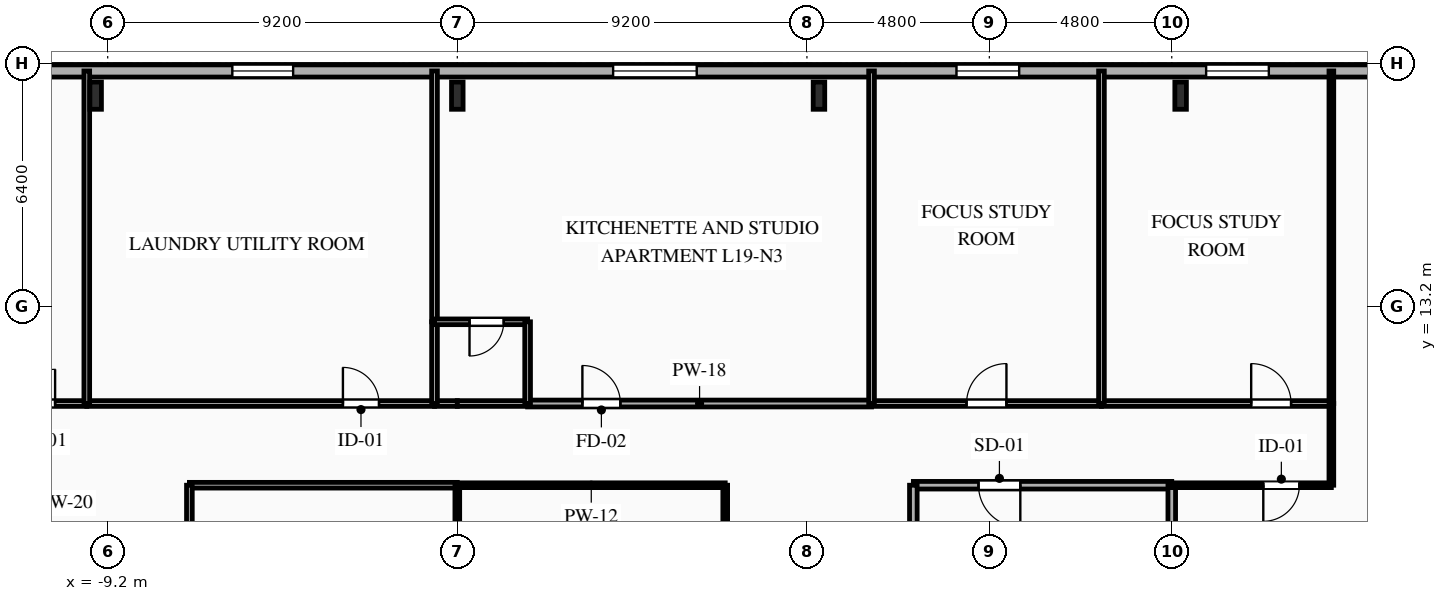
"""IFC4 building model, lengths in metres.
Left out: names, types, materials, properties, quantities, classifications, styles, units other than length and angle.
Written with IfcOpenShell. Run it as: python <this file> out.ifc"""

import sys

from ifc_helpers import new_model, si_unit, direction, frame, frame_2d, origin, origin_2d, place, context, subcontext, project, spatial, rectangle, i_section, extrude, element, fill, save


model = new_model("IFC4")
c1 = context("Model", 3, precision=1e-05, world=origin(), true_north=direction((0.0, 1.0)))
c2 = subcontext(c1, "Body", "Model", "MODEL_VIEW")
j1 = project(units=[si_unit("LENGTHUNIT", "METRE"), si_unit("PLANEANGLEUNIT", "RADIAN")], contexts=[c1])
p1 = place(None, origin())
s1 = spatial("IfcSite", under=j1, at=p1, CompositionType="ELEMENT")
p2 = place(p1, origin())
s2 = spatial("IfcBuilding", under=s1, at=p2, CompositionType="ELEMENT")
p3 = place(p2, frame((0.0, 0.0, 70.55)))
s3 = spatial("IfcBuildingStorey", under=s2, at=p3, CompositionType="ELEMENT", Elevation=70.55)
for number, where, z_axis, x_axis in (
    (1, (19.033, 18.75, 0.0), (0.0, 0.0, 1.0), (1.0, 0.0, 0.0)),
    (2, (9.517, 18.75, 0.0), (0.0, 0.0, 1.0), (1.0, 0.0, 0.0)),
    (3, (0.0, 18.75, 0.0), (0.0, 0.0, 1.0), (1.0, 0.0, 0.0)),
    (4, (-9.517, 18.75, 0.0), (0.0, 0.0, 1.0), (1.0, 0.0, 0.0)),
):
    element("IfcColumn", number, at=place(p3, frame(where, z_axis=z_axis, x_axis=x_axis)), inside=s3, PredefinedType="COLUMN", context=c2, shape_type="SweptSolid", body=[
        extrude(i_section(OverallWidth=0.304, OverallDepth=0.716, WebThickness=0.021, FlangeThickness=0.04, FilletRadius=0.027, at=origin_2d()), origin(), (0.0, 0.0, 1.0), 3.35),
    ])
p4 = place(p3, frame((-29.2, 19.4, 0.0), z_axis=(0.0, 0.0, 1.0), x_axis=(1.0, 0.0, 0.0)))
e5 = element("IfcWall", 5, at=p4, inside=s3, PredefinedType="SOLIDWALL", context=c2, shape_type="SweptSolid", body=[
    extrude(rectangle(XDim=58.4, YDim=0.32, at=frame_2d((29.2, 0.0))), origin(), (0.0, 0.0, 1.0), 3.0),
])
p5 = place(p4, frame((1.255, 0.0, 0.85)))
e6 = element("IfcOpeningElement", 6, at=p5, cuts=e5, PredefinedType="OPENING", context=c2, shape_type="SweptSolid", body=[
    extrude(rectangle(XDim=1.65, YDim=1.85, at=frame_2d((0.825, 0.925))), frame((0.0, 0.17, 0.0), z_axis=(0.0, -1.0, 0.0), x_axis=(1.0, 0.0, 0.0)), (0.0, 0.0, 1.0), 0.34),
])
p6 = place(p4, frame((4.26, 0.0, 0.85)))
e7 = element("IfcOpeningElement", 7, at=p6, cuts=e5, PredefinedType="OPENING", context=c2, shape_type="SweptSolid", body=[
    extrude(rectangle(XDim=1.4, YDim=1.85, at=frame_2d((0.7, 0.925))), frame((0.0, 0.17, 0.0), z_axis=(0.0, -1.0, 0.0), x_axis=(1.0, 0.0, 0.0)), (0.0, 0.0, 1.0), 0.34),
])
p7 = place(p4, frame((8.135, 0.0, 0.85)))
e8 = element("IfcOpeningElement", 8, at=p7, cuts=e5, PredefinedType="OPENING", context=c2, shape_type="SweptSolid", body=[
    extrude(rectangle(XDim=1.65, YDim=1.85, at=frame_2d((0.825, 0.925))), frame((0.0, 0.17, 0.0), z_axis=(0.0, -1.0, 0.0), x_axis=(1.0, 0.0, 0.0)), (0.0, 0.0, 1.0), 0.34),
])
p8 = place(p4, frame((13.575, 0.0, 0.85)))
e9 = element("IfcOpeningElement", 9, at=p8, cuts=e5, PredefinedType="OPENING", context=c2, shape_type="SweptSolid", body=[
    extrude(rectangle(XDim=1.65, YDim=1.85, at=frame_2d((0.825, 0.925))), frame((0.0, 0.17, 0.0), z_axis=(0.0, -1.0, 0.0), x_axis=(1.0, 0.0, 0.0)), (0.0, 0.0, 1.0), 0.34),
])
p9 = place(p4, frame((23.28, 0.0, 0.85)))
e10 = element("IfcOpeningElement", 10, at=p9, cuts=e5, PredefinedType="OPENING", context=c2, shape_type="SweptSolid", body=[
    extrude(rectangle(XDim=1.6, YDim=1.85, at=frame_2d((0.8, 0.925))), frame((0.0, 0.17, 0.0), z_axis=(0.0, -1.0, 0.0), x_axis=(1.0, 0.0, 0.0)), (0.0, 0.0, 1.0), 0.34),
])
p10 = place(p4, frame((33.3, 0.0, 0.85)))
e11 = element("IfcOpeningElement", 11, at=p10, cuts=e5, PredefinedType="OPENING", context=c2, shape_type="SweptSolid", body=[
    extrude(rectangle(XDim=2.2, YDim=1.85, at=frame_2d((1.1, 0.925))), frame((0.0, 0.17, 0.0), z_axis=(0.0, -1.0, 0.0), x_axis=(1.0, 0.0, 0.0)), (0.0, 0.0, 1.0), 0.34),
])
p11 = place(p4, frame((42.335, 0.0, 0.85)))
e12 = element("IfcOpeningElement", 12, at=p11, cuts=e5, PredefinedType="OPENING", context=c2, shape_type="SweptSolid", body=[
    extrude(rectangle(XDim=1.65, YDim=1.85, at=frame_2d((0.825, 0.925))), frame((0.0, 0.17, 0.0), z_axis=(0.0, -1.0, 0.0), x_axis=(1.0, 0.0, 0.0)), (0.0, 0.0, 1.0), 0.34),
])
p12 = place(p4, frame((48.905, 0.0, 0.85)))
e13 = element("IfcOpeningElement", 13, at=p12, cuts=e5, PredefinedType="OPENING", context=c2, shape_type="SweptSolid", body=[
    extrude(rectangle(XDim=1.65, YDim=1.85, at=frame_2d((0.825, 0.925))), frame((0.0, 0.17, 0.0), z_axis=(0.0, -1.0, 0.0), x_axis=(1.0, 0.0, 0.0)), (0.0, 0.0, 1.0), 0.34),
])
p13 = place(p4, frame((54.32, 0.0, 0.85)))
e14 = element("IfcOpeningElement", 14, at=p13, cuts=e5, PredefinedType="OPENING", context=c2, shape_type="SweptSolid", body=[
    extrude(rectangle(XDim=1.6, YDim=1.85, at=frame_2d((0.8, 0.925))), frame((0.0, 0.17, 0.0), z_axis=(0.0, -1.0, 0.0), x_axis=(1.0, 0.0, 0.0)), (0.0, 0.0, 1.0), 0.34),
])
p14 = place(p3, frame((18.8, 8.5, 0.0), z_axis=(0.0, 0.0, 1.0), x_axis=(-1.0, 0.0, 0.0)))
e15 = element("IfcWall", 15, at=p14, inside=s3, PredefinedType="PARTITIONING", context=c2, shape_type="SweptSolid", body=[
    extrude(rectangle(XDim=6.8, YDim=0.2, at=frame_2d((3.4, 0.0))), origin(), (0.0, 0.0, 1.0), 3.0),
])
p15 = place(p14, frame((3.985, 0.0, 0.0)))
e16 = element("IfcOpeningElement", 16, at=p15, cuts=e15, PredefinedType="OPENING", context=c2, shape_type="SweptSolid", body=[
    extrude(rectangle(XDim=1.1, YDim=2.15, at=frame_2d((0.55, 1.075))), frame((0.0, 0.11, 0.0), z_axis=(0.0, -1.0, 0.0), x_axis=(1.0, 0.0, 0.0)), (0.0, 0.0, 1.0), 0.22),
])
p16 = place(p3, frame((12.0, 8.5, 0.0), z_axis=(0.0, 0.0, 1.0), x_axis=(0.0, -1.0, 0.0)))
e17 = element("IfcWall", 17, at=p16, inside=s3, PredefinedType="PARTITIONING", context=c2, shape_type="SweptSolid", body=[
    extrude(rectangle(XDim=2.9, YDim=0.2, at=frame_2d((1.45, 0.0))), origin(), (0.0, 0.0, 1.0), 3.0),
])
p17 = place(p3, frame((18.8, 5.6, 0.0), z_axis=(0.0, 0.0, 1.0), x_axis=(0.0, 1.0, 0.0)))
e18 = element("IfcWall", 18, at=p17, inside=s3, PredefinedType="PARTITIONING", context=c2, shape_type="SweptSolid", body=[
    extrude(rectangle(XDim=2.9, YDim=0.2, at=frame_2d((1.45, 0.0))), origin(), (0.0, 0.0, 1.0), 2.485),
])
p18 = place(p3, frame((-12.1, 10.65, 0.0), z_axis=(0.0, 0.0, 1.0), x_axis=(1.0, 0.0, 0.0)))
e19 = element("IfcWall", 19, at=p18, inside=s3, PredefinedType="PLUMBINGWALL", context=c2, shape_type="SweptSolid", body=[
    extrude(rectangle(XDim=2.35, YDim=0.15, at=frame_2d((1.175, 0.0))), origin(), (0.0, 0.0, 1.0), 3.0),
])
p19 = place(p18, frame((0.616, 0.0, 0.0)))
e20 = element("IfcOpeningElement", 20, at=p19, cuts=e19, PredefinedType="OPENING", context=c2, shape_type="SweptSolid", body=[
    extrude(rectangle(XDim=0.9, YDim=2.1, at=frame_2d((0.45, 1.05))), frame((0.0, 0.085, 0.0), z_axis=(0.0, -1.0, 0.0), x_axis=(1.0, 0.0, 0.0)), (0.0, 0.0, 1.0), 0.17),
])
p20 = place(p3, frame((-9.75, 10.65, 0.0), z_axis=(0.0, 0.0, 1.0), x_axis=(1.0, 0.0, 0.0)))
e21 = element("IfcWall", 21, at=p20, inside=s3, PredefinedType="PARTITIONING", context=c2, shape_type="SweptSolid", body=[
    extrude(rectangle(XDim=9.15, YDim=0.15, at=frame_2d((4.575, 0.0))), origin(), (0.0, 0.0, 1.0), 3.0),
])
p21 = place(p20, frame((6.74, 0.0, 0.0)))
e22 = element("IfcOpeningElement", 22, at=p21, cuts=e21, PredefinedType="OPENING", context=c2, shape_type="SweptSolid", body=[
    extrude(rectangle(XDim=0.95, YDim=2.1, at=frame_2d((0.475, 1.05))), frame((0.0, 0.085, 0.0), z_axis=(0.0, -1.0, 0.0), x_axis=(1.0, 0.0, 0.0)), (0.0, 0.0, 1.0), 0.17),
])
p22 = place(p3, frame((-0.6, 10.65, 0.0), z_axis=(0.0, 0.0, 1.0), x_axis=(1.0, 0.0, 0.0)))
e23 = element("IfcWall", 23, at=p22, inside=s3, PredefinedType="PLUMBINGWALL", context=c2, shape_type="SweptSolid", body=[
    extrude(rectangle(XDim=0.6, YDim=0.15, at=frame_2d((0.3, 0.0))), origin(), (0.0, 0.0, 1.0), 3.0),
])
p23 = place(p3, frame((0.0, 8.5, 0.0), z_axis=(0.0, 0.0, 1.0), x_axis=(-1.0, 0.0, 0.0)))
e24 = element("IfcWall", 24, at=p23, inside=s3, PredefinedType="PARTITIONING", context=c2, shape_type="SweptSolid", body=[
    extrude(rectangle(XDim=7.05, YDim=0.15, at=frame_2d((3.525, 0.0))), origin(), (0.0, 0.0, 1.0), 3.0),
])
p24 = place(p3, frame((23.0, 8.5, 0.0), z_axis=(0.0, 0.0, 1.0), x_axis=(-1.0, 0.0, 0.0)))
e25 = element("IfcWall", 25, at=p24, inside=s3, PredefinedType="PARTITIONING", context=c2, shape_type="SweptSolid", body=[
    extrude(rectangle(XDim=4.2, YDim=0.125, at=frame_2d((2.1, 0.0))), origin(), (0.0, 0.0, 1.0), 3.0),
])
p25 = place(p24, frame((0.841, 0.0, 0.0)))
e26 = element("IfcOpeningElement", 26, at=p25, cuts=e25, PredefinedType="OPENING", context=c2, shape_type="SweptSolid", body=[
    extrude(rectangle(XDim=0.95, YDim=2.1, at=frame_2d((0.475, 1.05))), frame((0.0, 0.073, 0.0), z_axis=(0.0, -1.0, 0.0), x_axis=(1.0, 0.0, 0.0)), (0.0, 0.0, 1.0), 0.145),
])
p26 = place(p3, frame((23.0, 10.65, 0.0), z_axis=(0.0, 0.0, 1.0), x_axis=(0.0, -1.0, 0.0)))
e27 = element("IfcWall", 27, at=p26, inside=s3, PredefinedType="PARTITIONING", context=c2, shape_type="SweptSolid", body=[
    extrude(rectangle(XDim=2.15, YDim=0.125, at=frame_2d((1.075, 0.0))), origin(), (0.0, 0.0, 1.0), 3.0),
])
p27 = place(p3, frame((1.85, 10.65, 0.0), z_axis=(0.0, 0.0, 1.0), x_axis=(1.0, 0.0, 0.0)))
e28 = element("IfcWall", 28, at=p27, inside=s3, PredefinedType="PARTITIONING", context=c2, shape_type="SweptSolid", body=[
    extrude(rectangle(XDim=9.05, YDim=0.18, at=frame_2d((4.525, 0.0))), origin(), (0.0, 0.0, 1.0), 3.0),
])
p28 = place(p27, frame((1.441, 0.0, 0.0)))
e29 = element("IfcOpeningElement", 29, at=p28, cuts=e28, PredefinedType="OPENING", context=c2, shape_type="SweptSolid", body=[
    extrude(rectangle(XDim=1.0, YDim=2.15, at=frame_2d((0.5, 1.075))), frame((0.0, 0.1, 0.0), z_axis=(0.0, -1.0, 0.0), x_axis=(1.0, 0.0, 0.0)), (0.0, 0.0, 1.0), 0.2),
])
p29 = place(p3, frame((0.0, 10.65, 0.0), z_axis=(0.0, 0.0, 1.0), x_axis=(1.0, 0.0, 0.0)))
e30 = element("IfcWall", 30, at=p29, inside=s3, PredefinedType="PLUMBINGWALL", context=c2, shape_type="SweptSolid", body=[
    extrude(rectangle(XDim=1.85, YDim=0.15, at=frame_2d((0.925, 0.0))), origin(), (0.0, 0.0, 1.0), 3.0),
])
p30 = place(p3, frame((10.9, 10.65, 0.0), z_axis=(0.0, 0.0, 1.0), x_axis=(1.0, 0.0, 0.0)))
e31 = element("IfcWall", 31, at=p30, inside=s3, PredefinedType="PARTITIONING", context=c2, shape_type="SweptSolid", body=[
    extrude(rectangle(XDim=6.05, YDim=0.15, at=frame_2d((3.025, 0.0))), origin(), (0.0, 0.0, 1.0), 3.0),
])
p31 = place(p30, frame((2.5, 0.0, 0.0)))
e32 = element("IfcOpeningElement", 32, at=p31, cuts=e31, PredefinedType="OPENING", context=c2, shape_type="SweptSolid", body=[
    extrude(rectangle(XDim=1.05, YDim=2.15, at=frame_2d((0.525, 1.075))), frame((0.0, 0.085, 0.0), z_axis=(0.0, -1.0, 0.0), x_axis=(1.0, 0.0, 0.0)), (0.0, 0.0, 1.0), 0.17),
])
p32 = place(p3, frame((16.95, 10.65, 0.0), z_axis=(0.0, 0.0, 1.0), x_axis=(1.0, 0.0, 0.0)))
e33 = element("IfcWall", 33, at=p32, inside=s3, PredefinedType="PARTITIONING", context=c2, shape_type="SweptSolid", body=[
    extrude(rectangle(XDim=6.05, YDim=0.15, at=frame_2d((3.025, 0.0))), origin(), (0.0, 0.0, 1.0), 3.0),
])
p33 = place(p32, frame((3.94, 0.0, 0.0)))
e34 = element("IfcOpeningElement", 34, at=p33, cuts=e33, PredefinedType="OPENING", context=c2, shape_type="SweptSolid", body=[
    extrude(rectangle(XDim=1.05, YDim=2.15, at=frame_2d((0.525, 1.075))), frame((0.0, 0.085, 0.0), z_axis=(0.0, -1.0, 0.0), x_axis=(1.0, 0.0, 0.0)), (0.0, 0.0, 1.0), 0.17),
])
p34 = place(p3, frame((7.05, 8.5, 0.0), z_axis=(0.0, 0.0, 1.0), x_axis=(-1.0, 0.0, 0.0)))
e35 = element("IfcWall", 35, at=p34, inside=s3, PredefinedType="PARTITIONING", context=c2, shape_type="SweptSolid", body=[
    extrude(rectangle(XDim=7.05, YDim=0.125, at=frame_2d((3.525, 0.0))), origin(), (0.0, 0.0, 1.0), 3.0),
])
p35 = place(p3, frame((-7.05, 8.5, 0.0), z_axis=(0.0, 0.0, 1.0), x_axis=(0.0, -1.0, 0.0)))
e36 = element("IfcWall", 36, at=p35, inside=s3, PredefinedType="PARTITIONING", context=c2, shape_type="SweptSolid", body=[
    extrude(rectangle(XDim=14.1, YDim=0.15, at=frame_2d((7.05, 0.0))), origin(), (0.0, 0.0, 1.0), 3.0),
])
p36 = place(p35, frame((8.074, 0.0, 0.0)))
e37 = element("IfcOpeningElement", 37, at=p36, cuts=e36, PredefinedType="OPENING", context=c2, shape_type="SweptSolid", body=[
    extrude(rectangle(XDim=0.95, YDim=2.1, at=frame_2d((0.475, 1.05))), frame((0.0, 0.085, 0.0), z_axis=(0.0, -1.0, 0.0), x_axis=(1.0, 0.0, 0.0)), (0.0, 0.0, 1.0), 0.17),
])
p37 = place(p3, frame((7.05, -5.6, 0.0), z_axis=(0.0, 0.0, 1.0), x_axis=(0.0, 1.0, 0.0)))
e38 = element("IfcWall", 38, at=p37, inside=s3, PredefinedType="PARTITIONING", context=c2, shape_type="SweptSolid", body=[
    extrude(rectangle(XDim=14.1, YDim=0.125, at=frame_2d((7.05, 0.0))), origin(), (0.0, 0.0, 1.0), 3.0),
])
p38 = place(p37, frame((5.076, 0.0, 0.0)))
e39 = element("IfcOpeningElement", 39, at=p38, cuts=e38, PredefinedType="OPENING", context=c2, shape_type="SweptSolid", body=[
    extrude(rectangle(XDim=0.95, YDim=2.1, at=frame_2d((0.475, 1.05))), frame((0.0, 0.073, 0.0), z_axis=(0.0, -1.0, 0.0), x_axis=(1.0, 0.0, 0.0)), (0.0, 0.0, 1.0), 0.145),
])
p39 = place(p3, frame((23.0, 10.65, 0.0), z_axis=(0.0, 0.0, 1.0), x_axis=(0.0, 1.0, 0.0)))
e40 = element("IfcWall", 40, at=p39, inside=s3, PredefinedType="PARTITIONING", context=c2, shape_type="SweptSolid", body=[
    extrude(rectangle(XDim=8.75, YDim=0.125, at=frame_2d((4.375, 0.0))), origin(), (0.0, 0.0, 1.0), 3.0),
])
p40 = place(p3, frame((-9.75, 19.4, 0.0), z_axis=(0.0, 0.0, 1.0), x_axis=(0.0, -1.0, 0.0)))
e41 = element("IfcWall", 41, at=p40, inside=s3, PredefinedType="PLUMBINGWALL", context=c2, shape_type="SweptSolid", body=[
    extrude(rectangle(XDim=8.75, YDim=0.15, at=frame_2d((4.375, 0.0))), origin(), (0.0, 0.0, 1.0), 3.0),
])
p41 = place(p3, frame((-0.6, 19.4, 0.0), z_axis=(0.0, 0.0, 1.0), x_axis=(0.0, -1.0, 0.0)))
e42 = element("IfcWall", 42, at=p41, inside=s3, PredefinedType="PARTITIONING", context=c2, shape_type="SweptSolid", body=[
    extrude(rectangle(XDim=6.6, YDim=0.15, at=frame_2d((3.3, 0.0))), origin(), (0.0, 0.0, 1.0), 3.0),
])
p42 = place(p3, frame((-0.6, 12.8, 0.0), z_axis=(0.0, 0.0, 1.0), x_axis=(0.0, -1.0, 0.0)))
e43 = element("IfcWall", 43, at=p42, inside=s3, PredefinedType="PLUMBINGWALL", context=c2, shape_type="SweptSolid", body=[
    extrude(rectangle(XDim=2.15, YDim=0.15, at=frame_2d((1.075, 0.0))), origin(), (0.0, 0.0, 1.0), 3.0),
])
p43 = place(p3, frame((1.85, 12.8, 0.0), z_axis=(0.0, 0.0, 1.0), x_axis=(-1.0, 0.0, 0.0)))
e44 = element("IfcWall", 44, at=p43, inside=s3, PredefinedType="PLUMBINGWALL", context=c2, shape_type="SweptSolid", body=[
    extrude(rectangle(XDim=2.45, YDim=0.15, at=frame_2d((1.225, 0.0))), origin(), (0.0, 0.0, 1.0), 3.0),
])
p44 = place(p43, frame((0.629, 0.0, 0.0)))
e45 = element("IfcOpeningElement", 45, at=p44, cuts=e44, PredefinedType="OPENING", context=c2, shape_type="SweptSolid", body=[
    extrude(rectangle(XDim=0.9, YDim=2.1, at=frame_2d((0.45, 1.05))), frame((0.0, 0.085, 0.0), z_axis=(0.0, -1.0, 0.0), x_axis=(1.0, 0.0, 0.0)), (0.0, 0.0, 1.0), 0.17),
])
p45 = place(p3, frame((1.85, 10.65, 0.0), z_axis=(0.0, 0.0, 1.0), x_axis=(0.0, 1.0, 0.0)))
e46 = element("IfcWall", 46, at=p45, inside=s3, PredefinedType="PLUMBINGWALL", context=c2, shape_type="SweptSolid", body=[
    extrude(rectangle(XDim=2.15, YDim=0.15, at=frame_2d((1.075, 0.0))), origin(), (0.0, 0.0, 1.0), 3.0),
])
for number, where, z_axis, x_axis in (
    (47, (10.9, 19.4, 0.0), (0.0, 0.0, 1.0), (0.0, -1.0, 0.0)),
    (48, (16.95, 19.4, 0.0), (0.0, 0.0, 1.0), (0.0, -1.0, 0.0)),
):
    element("IfcWall", number, at=place(p3, frame(where, z_axis=z_axis, x_axis=x_axis)), inside=s3, PredefinedType="PARTITIONING", context=c2, shape_type="SweptSolid", body=[
        extrude(rectangle(XDim=8.75, YDim=0.15, at=frame_2d((4.375, 0.0))), origin(), (0.0, 0.0, 1.0), 3.0),
    ])
p46 = place(p3, frame((0.0, 8.5, 0.0), z_axis=(0.0, 0.0, 1.0), x_axis=(0.0, -1.0, 0.0)))
e49 = element("IfcWall", 49, at=p46, inside=s3, PredefinedType="PARTITIONING", context=c2, shape_type="SweptSolid", body=[
    extrude(rectangle(XDim=14.1, YDim=0.125, at=frame_2d((7.05, 0.0))), origin(), (0.0, 0.0, 1.0), 3.0),
])
p47 = place(p9, origin())
e50 = element("IfcWindow", 50, at=p47, inside=s3, PartitioningType="SINGLE_PANEL", PredefinedType="WINDOW", context=c2, shape_type="SweptSolid", body=[
    extrude(rectangle(XDim=1.6, YDim=1.85, at=frame_2d((0.8, 0.925))), frame((0.0, 0.03, 0.0), z_axis=(0.0, -1.0, 0.0), x_axis=(1.0, 0.0, 0.0)), (0.0, 0.0, 1.0), 0.06),
])
fill(e10, e50)
p48 = place(p10, origin())
e51 = element("IfcWindow", 51, at=p48, inside=s3, PartitioningType="SINGLE_PANEL", PredefinedType="WINDOW", context=c2, shape_type="SweptSolid", body=[
    extrude(rectangle(XDim=2.2, YDim=1.85, at=frame_2d((1.1, 0.925))), frame((0.0, 0.03, 0.0), z_axis=(0.0, -1.0, 0.0), x_axis=(1.0, 0.0, 0.0)), (0.0, 0.0, 1.0), 0.06),
])
fill(e11, e51)
p49 = place(p11, origin())
e52 = element("IfcWindow", 52, at=p49, inside=s3, PartitioningType="SINGLE_PANEL", PredefinedType="WINDOW", context=c2, shape_type="SweptSolid", body=[
    extrude(rectangle(XDim=1.65, YDim=1.85, at=frame_2d((0.825, 0.925))), frame((0.0, 0.03, 0.0), z_axis=(0.0, -1.0, 0.0), x_axis=(1.0, 0.0, 0.0)), (0.0, 0.0, 1.0), 0.06),
])
fill(e12, e52)
p50 = place(p12, origin())
e53 = element("IfcWindow", 53, at=p50, inside=s3, PartitioningType="SINGLE_PANEL", PredefinedType="WINDOW", context=c2, shape_type="SweptSolid", body=[
    extrude(rectangle(XDim=1.65, YDim=1.85, at=frame_2d((0.825, 0.925))), frame((0.0, 0.03, 0.0), z_axis=(0.0, -1.0, 0.0), x_axis=(1.0, 0.0, 0.0)), (0.0, 0.0, 1.0), 0.06),
])
fill(e13, e53)
p51 = place(p15, origin())
e54 = element("IfcDoor", 54, at=p51, inside=s3, OperationType="SINGLE_SWING_LEFT", PredefinedType="DOOR", context=c2, shape_type="SweptSolid", body=[
    extrude(rectangle(XDim=1.1, YDim=2.15, at=frame_2d((0.55, 1.075))), frame((0.0, 0.025, 0.0), z_axis=(0.0, -1.0, 0.0), x_axis=(1.0, 0.0, 0.0)), (0.0, 0.0, 1.0), 0.05),
])
fill(e16, e54)
p52 = place(p19, origin())
e55 = element("IfcDoor", 55, at=p52, inside=s3, OperationType="SINGLE_SWING_RIGHT", PredefinedType="DOOR", context=c2, shape_type="SweptSolid", body=[
    extrude(rectangle(XDim=0.9, YDim=2.1, at=frame_2d((0.45, 1.05))), frame((0.0, 0.025, 0.0), z_axis=(0.0, -1.0, 0.0), x_axis=(1.0, 0.0, 0.0)), (0.0, 0.0, 1.0), 0.05),
])
fill(e20, e55)
p53 = place(p21, origin())
e56 = element("IfcDoor", 56, at=p53, inside=s3, OperationType="SINGLE_SWING_LEFT", PredefinedType="DOOR", context=c2, shape_type="SweptSolid", body=[
    extrude(rectangle(XDim=0.95, YDim=2.1, at=frame_2d((0.475, 1.05))), frame((0.0, 0.025, 0.0), z_axis=(0.0, -1.0, 0.0), x_axis=(1.0, 0.0, 0.0)), (0.0, 0.0, 1.0), 0.05),
])
fill(e22, e56)
p54 = place(p25, origin())
e57 = element("IfcDoor", 57, at=p54, inside=s3, OperationType="SINGLE_SWING_RIGHT", PredefinedType="DOOR", context=c2, shape_type="SweptSolid", body=[
    extrude(rectangle(XDim=0.95, YDim=2.1, at=frame_2d((0.475, 1.05))), frame((0.0, 0.025, 0.0), z_axis=(0.0, -1.0, 0.0), x_axis=(1.0, 0.0, 0.0)), (0.0, 0.0, 1.0), 0.05),
])
fill(e26, e57)
p55 = place(p28, origin())
e58 = element("IfcDoor", 58, at=p55, inside=s3, OperationType="SINGLE_SWING_LEFT", PredefinedType="DOOR", context=c2, shape_type="SweptSolid", body=[
    extrude(rectangle(XDim=1.0, YDim=2.15, at=frame_2d((0.5, 1.075))), frame((0.0, 0.025, 0.0), z_axis=(0.0, -1.0, 0.0), x_axis=(1.0, 0.0, 0.0)), (0.0, 0.0, 1.0), 0.05),
])
fill(e29, e58)
p56 = place(p31, origin())
e59 = element("IfcDoor", 59, at=p56, inside=s3, OperationType="SINGLE_SWING_RIGHT", PredefinedType="DOOR", context=c2, shape_type="SweptSolid", body=[
    extrude(rectangle(XDim=1.05, YDim=2.15, at=frame_2d((0.525, 1.075))), frame((0.0, 0.025, 0.0), z_axis=(0.0, -1.0, 0.0), x_axis=(1.0, 0.0, 0.0)), (0.0, 0.0, 1.0), 0.05),
])
fill(e32, e59)
p57 = place(p33, origin())
e60 = element("IfcDoor", 60, at=p57, inside=s3, OperationType="SINGLE_SWING_LEFT", PredefinedType="DOOR", context=c2, shape_type="SweptSolid", body=[
    extrude(rectangle(XDim=1.05, YDim=2.15, at=frame_2d((0.525, 1.075))), frame((0.0, 0.025, 0.0), z_axis=(0.0, -1.0, 0.0), x_axis=(1.0, 0.0, 0.0)), (0.0, 0.0, 1.0), 0.05),
])
fill(e34, e60)
p58 = place(p44, origin())
e61 = element("IfcDoor", 61, at=p58, inside=s3, OperationType="SINGLE_SWING_RIGHT", PredefinedType="DOOR", context=c2, shape_type="SweptSolid", body=[
    extrude(rectangle(XDim=0.9, YDim=2.1, at=frame_2d((0.45, 1.05))), frame((0.0, 0.025, 0.0), z_axis=(0.0, -1.0, 0.0), x_axis=(1.0, 0.0, 0.0)), (0.0, 0.0, 1.0), 0.05),
])
fill(e45, e61)
save(model, sys.argv[1])
